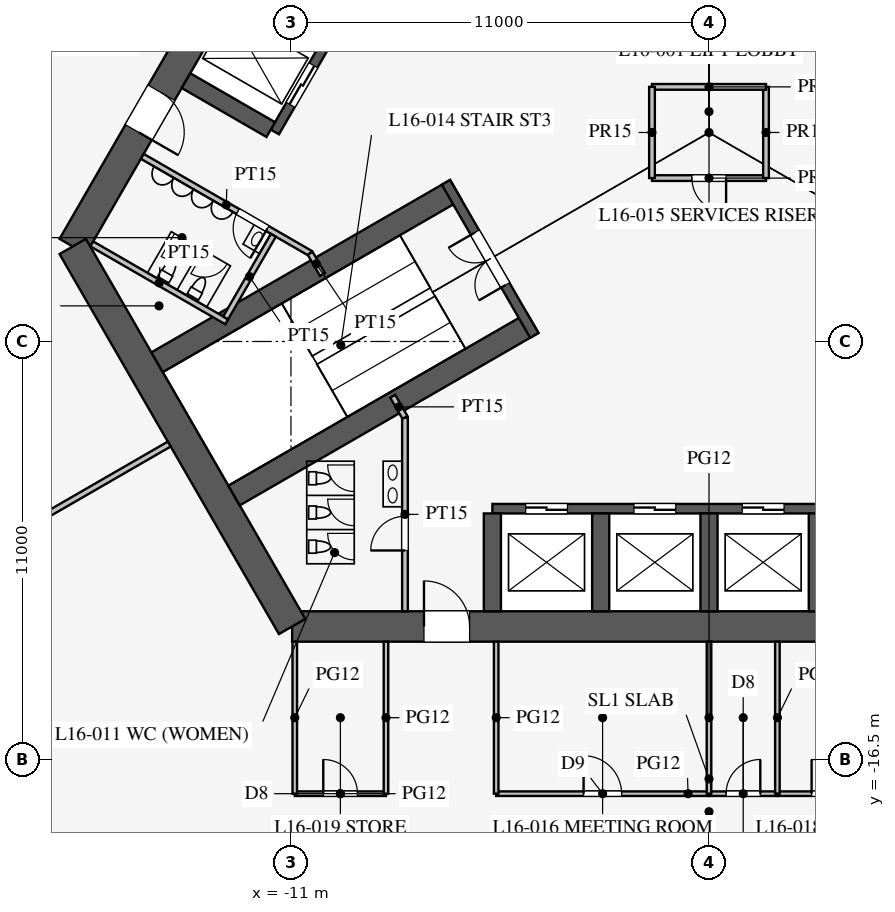
"""IFC4 building model, lengths in metres.
Left out: names, types, materials, properties, quantities, classifications, styles, units other than length and angle.
Written with IfcOpenShell. Run it as: python <this file> out.ifc"""

import sys

from ifc_helpers import new_model, si_unit, direction, frame, frame_2d, origin, place, context, subcontext, project, spatial, rectangle, extrude, element, fill, save


model = new_model("IFC4")
c1 = context("Model", 3, precision=1e-05, world=origin(), true_north=direction((0.0, 1.0)))
c2 = subcontext(c1, "Body", "Model", "MODEL_VIEW")
j1 = project(units=[si_unit("LENGTHUNIT", "METRE"), si_unit("PLANEANGLEUNIT", "RADIAN")], contexts=[c1])
p1 = place(None, origin())
s1 = spatial("IfcSite", under=j1, at=p1, CompositionType="ELEMENT")
p2 = place(p1, origin())
s2 = spatial("IfcBuilding", under=s1, at=p2, CompositionType="ELEMENT")
p3 = place(p2, frame((0.0, 0.0, 71.1)))
s3 = spatial("IfcBuildingStorey", under=s2, at=p3, CompositionType="ELEMENT", Elevation=71.1)
p4 = place(p3, frame((-10.97, -13.0, 0.0), z_axis=(0.0, 0.0, 1.0), x_axis=(1.0, 0.0, 0.0)))
e1 = element("IfcWall", 1, at=p4, inside=s3, PredefinedType="SHEAR", context=c2, shape_type="SweptSolid", body=[
    extrude(rectangle(XDim=21.939, YDim=0.8, at=frame_2d((10.97, 0.0))), origin(), (0.0, 0.0, 1.0), 4.2),
])
p5 = place(p4, frame((17.27, 0.0, 0.0)))
e2 = element("IfcOpeningElement", 2, at=p5, cuts=e1, PredefinedType="OPENING", context=c2, shape_type="SweptSolid", body=[
    extrude(rectangle(XDim=1.2, YDim=2.1, at=frame_2d((0.6, 1.05))), frame((0.0, 0.41, 0.0), z_axis=(0.0, -1.0, 0.0), x_axis=(1.0, 0.0, 0.0)), (0.0, 0.0, 1.0), 0.82),
])
p6 = place(p4, frame((3.47, 0.0, 0.0)))
e3 = element("IfcOpeningElement", 3, at=p6, cuts=e1, PredefinedType="OPENING", context=c2, shape_type="SweptSolid", body=[
    extrude(rectangle(XDim=1.2, YDim=2.1, at=frame_2d((0.6, 1.05))), frame((0.0, 0.41, 0.0), z_axis=(0.0, -1.0, 0.0), x_axis=(1.0, 0.0, 0.0)), (0.0, 0.0, 1.0), 0.82),
])
p7 = place(p3, frame((-5.773, 16.0, 0.0), z_axis=(0.0, 0.0, 1.0), x_axis=(-0.500002442456, -0.866023993627, 0.0)))
e4 = element("IfcWall", 4, at=p7, inside=s3, PredefinedType="SHEAR", context=c2, shape_type="SweptSolid", body=[
    extrude(rectangle(XDim=21.939, YDim=0.8, at=frame_2d((10.97, 0.0))), origin(), (0.0, 0.0, 1.0), 4.2),
])
p8 = place(p7, frame((17.27, 0.0, 0.0)))
e5 = element("IfcOpeningElement", 5, at=p8, cuts=e4, PredefinedType="OPENING", context=c2, shape_type="SweptSolid", body=[
    extrude(rectangle(XDim=1.2, YDim=2.1, at=frame_2d((0.6, 1.05))), frame((0.0, 0.41, 0.0), z_axis=(0.0, -1.0, 0.0), x_axis=(1.0, 0.0, 0.0)), (0.0, 0.0, 1.0), 0.82),
])
p9 = place(p7, frame((3.47, 0.0, 0.0)))
e6 = element("IfcOpeningElement", 6, at=p9, cuts=e4, PredefinedType="OPENING", context=c2, shape_type="SweptSolid", body=[
    extrude(rectangle(XDim=1.2, YDim=2.1, at=frame_2d((0.6, 1.05))), frame((0.0, 0.41, 0.0), z_axis=(0.0, -1.0, 0.0), x_axis=(1.0, 0.0, 0.0)), (0.0, 0.0, 1.0), 0.82),
])
p10 = place(p3, frame((-16.743, -3.0, 0.0), z_axis=(0.0, 0.0, 1.0), x_axis=(0.499995765644, -0.866027848477, 0.0)))
e7 = element("IfcWall", 7, at=p10, inside=s3, PredefinedType="SHEAR", context=c2, shape_type="SweptSolid", body=[
    extrude(rectangle(XDim=11.547, YDim=0.8, at=frame_2d((5.773, 0.0))), origin(), (0.0, 0.0, 1.0), 4.2),
])
p11 = place(p3, frame((-5.7, -9.9, 0.0), z_axis=(0.0, 0.0, 1.0), x_axis=(1.0, 0.0, 0.0)))
e8 = element("IfcWall", 8, at=p11, inside=s3, PredefinedType="SHEAR", context=c2, shape_type="SweptSolid", body=[
    extrude(rectangle(XDim=11.4, YDim=0.25, at=frame_2d((5.7, 0.0))), origin(), (0.0, 0.0, 1.0), 4.2),
])
p12 = place(p11, frame((0.875, 0.0, 0.0)))
e9 = element("IfcOpeningElement", 9, at=p12, cuts=e8, PredefinedType="OPENING", context=c2, shape_type="SweptSolid", body=[
    extrude(rectangle(XDim=1.1, YDim=2.2, at=frame_2d((0.55, 1.1))), frame((0.0, 0.135, 0.0), z_axis=(0.0, -1.0, 0.0), x_axis=(1.0, 0.0, 0.0)), (0.0, 0.0, 1.0), 0.27),
])
p13 = place(p11, frame((3.725, 0.0, 0.0)))
e10 = element("IfcOpeningElement", 10, at=p13, cuts=e8, PredefinedType="OPENING", context=c2, shape_type="SweptSolid", body=[
    extrude(rectangle(XDim=1.1, YDim=2.2, at=frame_2d((0.55, 1.1))), frame((0.0, 0.135, 0.0), z_axis=(0.0, -1.0, 0.0), x_axis=(1.0, 0.0, 0.0)), (0.0, 0.0, 1.0), 0.27),
])
p14 = place(p11, frame((6.575, 0.0, 0.0)))
e11 = element("IfcOpeningElement", 11, at=p14, cuts=e8, PredefinedType="OPENING", context=c2, shape_type="SweptSolid", body=[
    extrude(rectangle(XDim=1.1, YDim=2.2, at=frame_2d((0.55, 1.1))), frame((0.0, 0.135, 0.0), z_axis=(0.0, -1.0, 0.0), x_axis=(1.0, 0.0, 0.0)), (0.0, 0.0, 1.0), 0.27),
])
p15 = place(p11, frame((9.425, 0.0, 0.0)))
e12 = element("IfcOpeningElement", 12, at=p15, cuts=e8, PredefinedType="OPENING", context=c2, shape_type="SweptSolid", body=[
    extrude(rectangle(XDim=1.1, YDim=2.2, at=frame_2d((0.55, 1.1))), frame((0.0, 0.135, 0.0), z_axis=(0.0, -1.0, 0.0), x_axis=(1.0, 0.0, 0.0)), (0.0, 0.0, 1.0), 0.27),
])
for number, where, z_axis, x_axis in (
    (13, (-5.7, -10.025, 0.0), (0.0, 0.0, 1.0), (0.0, -1.0, 0.0)),
    (14, (-2.85, -10.025, 0.0), (0.0, 0.0, 1.0), (0.0, -1.0, 0.0)),
    (15, (0.0, -10.025, 0.0), (0.0, 0.0, 1.0), (0.0, -1.0, 0.0)),
    (16, (2.85, -10.025, 0.0), (0.0, 0.0, 1.0), (0.0, -1.0, 0.0)),
):
    element("IfcWall", number, at=place(p3, frame(where, z_axis=z_axis, x_axis=x_axis)), inside=s3, PredefinedType="SHEAR", context=c2, shape_type="SweptSolid", body=[
        extrude(rectangle(XDim=2.575, YDim=0.45, at=frame_2d((1.288, 0.0))), origin(), (0.0, 0.0, 1.0), 4.2),
    ])
p16 = place(p3, frame((-5.724, 9.886, 0.0), z_axis=(0.0, 0.0, 1.0), x_axis=(-0.500001763848, -0.866024385424, 0.0)))
e17 = element("IfcWall", 17, at=p16, inside=s3, PredefinedType="SHEAR", context=c2, shape_type="SweptSolid", body=[
    extrude(rectangle(XDim=11.4, YDim=0.25, at=frame_2d((5.7, 0.0))), origin(), (0.0, 0.0, 1.0), 4.2),
])
p17 = place(p16, frame((6.525, 0.0, 0.0)))
e18 = element("IfcOpeningElement", 18, at=p17, cuts=e17, PredefinedType="OPENING", context=c2, shape_type="SweptSolid", body=[
    extrude(rectangle(XDim=1.2, YDim=2.2, at=frame_2d((0.6, 1.1))), frame((0.0, 0.135, 0.0), z_axis=(0.0, -1.0, 0.0), x_axis=(1.0, 0.0, 0.0)), (0.0, 0.0, 1.0), 0.27),
])
p18 = place(p16, frame((9.375, 0.0, 0.0)))
e19 = element("IfcOpeningElement", 19, at=p18, cuts=e17, PredefinedType="OPENING", context=c2, shape_type="SweptSolid", body=[
    extrude(rectangle(XDim=1.2, YDim=2.2, at=frame_2d((0.6, 1.1))), frame((0.0, 0.135, 0.0), z_axis=(0.0, -1.0, 0.0), x_axis=(1.0, 0.0, 0.0)), (0.0, 0.0, 1.0), 0.27),
])
p19 = place(p3, frame((-11.532, 0.076, 0.0), z_axis=(0.0, 0.0, 1.0), x_axis=(-0.866005588531, 0.500034319456, 0.0)))
e20 = element("IfcWall", 20, at=p19, inside=s3, PredefinedType="SHEAR", context=c2, shape_type="SweptSolid", body=[
    extrude(rectangle(XDim=2.575, YDim=0.45, at=frame_2d((1.288, 0.0))), origin(), (0.0, 0.0, 1.0), 4.2),
])
for number, where, z_axis, x_axis in (
    (21, (-6.663, -1.509, 0.0), (0.0, 0.0, 1.0), (-0.866, -0.5, 0.0)),
    (22, (-4.638, -5.016, 0.0), (0.0, 0.0, 1.0), (-0.866, -0.5, 0.0)),
):
    element("IfcWall", number, at=place(p3, frame(where, z_axis=z_axis, x_axis=x_axis)), inside=s3, PredefinedType="SHEAR", context=c2, shape_type="SweptSolid", body=[
        extrude(rectangle(XDim=9.075, YDim=0.6, at=frame_2d((4.538, 0.0))), origin(), (0.0, 0.0, 1.0), 4.2),
    ])
p20 = place(p3, frame((-6.922, -1.312, 0.0), z_axis=(0.0, 0.0, 1.0), x_axis=(0.499984536904, -0.866034331223, 0.0)))
e23 = element("IfcWall", 23, at=p20, inside=s3, PredefinedType="SHEAR", context=c2, shape_type="SweptSolid", body=[
    extrude(rectangle(XDim=4.65, YDim=0.25, at=frame_2d((2.325, 0.0))), origin(), (0.0, 0.0, 1.0), 4.2),
])
p21 = place(p20, frame((1.525, 0.0, 0.0)))
e24 = element("IfcOpeningElement", 24, at=p21, cuts=e23, PredefinedType="OPENING", context=c2, shape_type="SweptSolid", body=[
    extrude(rectangle(XDim=1.6, YDim=2.1, at=frame_2d((0.8, 1.05))), frame((0.0, 0.135, 0.0), z_axis=(0.0, -1.0, 0.0), x_axis=(1.0, 0.0, 0.0)), (0.0, 0.0, 1.0), 0.27),
])
p22 = place(p3, frame((-8.0, -7.5, 0.0), z_axis=(0.0, 0.0, 1.0), x_axis=(0.0, -1.0, 0.0)))
e25 = element("IfcWall", 25, at=p22, inside=s3, PredefinedType="PARTITIONING", context=c2, shape_type="SweptSolid", body=[
    extrude(rectangle(XDim=5.1, YDim=0.15, at=frame_2d((2.55, 0.0))), origin(), (0.0, 0.0, 1.0), 4.0),
])
p23 = place(p22, frame((2.6, 0.0, 0.0)))
e26 = element("IfcOpeningElement", 26, at=p23, cuts=e25, PredefinedType="OPENING", context=c2, shape_type="SweptSolid", body=[
    extrude(rectangle(XDim=0.9, YDim=2.1, at=frame_2d((0.45, 1.05))), frame((0.0, 0.085, 0.0), z_axis=(0.0, -1.0, 0.0), x_axis=(1.0, 0.0, 0.0)), (0.0, 0.0, 1.0), 0.17),
])
p24 = place(p3, frame((-10.495, -3.178, 0.0), z_axis=(0.0, 0.0, 1.0), x_axis=(-0.86602216432, 0.500005610874, 0.0)))
e27 = element("IfcWall", 27, at=p24, inside=s3, PredefinedType="PARTITIONING", context=c2, shape_type="SweptSolid", body=[
    extrude(rectangle(XDim=5.1, YDim=0.15, at=frame_2d((2.55, 0.0))), origin(), (0.0, 0.0, 1.0), 4.0),
])
p25 = place(p24, frame((1.3, 0.0, 0.0)))
e28 = element("IfcOpeningElement", 28, at=p25, cuts=e27, PredefinedType="OPENING", context=c2, shape_type="SweptSolid", body=[
    extrude(rectangle(XDim=0.9, YDim=2.1, at=frame_2d((0.45, 1.05))), frame((0.0, 0.085, 0.0), z_axis=(0.0, -1.0, 0.0), x_axis=(1.0, 0.0, 0.0)), (0.0, 0.0, 1.0), 0.17),
])
for number, where, z_axis, x_axis in (
    (29, (-10.495, -3.178, 0.0), (0.0, 0.0, 1.0), (0.5, -0.866, 0.0)),
    (30, (-8.0, -7.5, 0.0), (0.0, 0.0, 1.0), (-0.5, 0.866, 0.0)),
):
    element("IfcWall", number, at=place(p3, frame(where, z_axis=z_axis, x_axis=x_axis)), inside=s3, PredefinedType="PARTITIONING", context=c2, shape_type="SweptSolid", body=[
        extrude(rectangle(XDim=0.645, YDim=0.15, at=frame_2d((0.323, 0.0))), origin(), (0.0, 0.0, 1.0), 4.0),
    ])
p26 = place(p3, frame((-12.691, -4.982, 0.0), z_axis=(0.0, 0.0, 1.0), x_axis=(-0.8660249478, 0.500000789788, 0.0)))
e31 = element("IfcWall", 31, at=p26, inside=s3, PredefinedType="PARTITIONING", context=c2, shape_type="SweptSolid", body=[
    extrude(rectangle(XDim=4.1, YDim=0.15, at=frame_2d((2.05, 0.0))), origin(), (0.0, 0.0, 1.0), 4.0),
])
p27 = place(p3, frame((-11.464, -2.706, 0.0), z_axis=(0.0, 0.0, 1.0), x_axis=(-0.50001992892, -0.866013897511, 0.0)))
e32 = element("IfcWall", 32, at=p27, inside=s3, PredefinedType="PARTITIONING", context=c2, shape_type="SweptSolid", body=[
    extrude(rectangle(XDim=2.51, YDim=0.15, at=frame_2d((1.255, 0.0))), origin(), (0.0, 0.0, 1.0), 4.0),
])
p28 = place(p3, frame((-1.5, -1.2, 0.0), z_axis=(0.0, 0.0, 1.0), x_axis=(1.0, 0.0, 0.0)))
e33 = element("IfcWall", 33, at=p28, inside=s3, PredefinedType="PARTITIONING", context=c2, shape_type="SweptSolid", body=[
    extrude(rectangle(XDim=3.0, YDim=0.15, at=frame_2d((1.5, 0.0))), origin(), (0.0, 0.0, 1.0), 4.0),
])
p29 = place(p28, frame((1.05, 0.0, 0.0)))
e34 = element("IfcOpeningElement", 34, at=p29, cuts=e33, PredefinedType="OPENING", context=c2, shape_type="SweptSolid", body=[
    extrude(rectangle(XDim=0.9, YDim=2.1, at=frame_2d((0.45, 1.05))), frame((0.0, 0.085, 0.0), z_axis=(0.0, -1.0, 0.0), x_axis=(1.0, 0.0, 0.0)), (0.0, 0.0, 1.0), 0.17),
])
p30 = place(p3, frame((1.5, -1.2, 0.0), z_axis=(0.0, 0.0, 1.0), x_axis=(0.0, 1.0, 0.0)))
e35 = element("IfcWall", 35, at=p30, inside=s3, PredefinedType="PARTITIONING", context=c2, shape_type="SweptSolid", body=[
    extrude(rectangle(XDim=2.4, YDim=0.15, at=frame_2d((1.2, 0.0))), origin(), (0.0, 0.0, 1.0), 4.0),
])
p31 = place(p3, frame((1.5, 1.2, 0.0), z_axis=(0.0, 0.0, 1.0), x_axis=(-1.0, 0.0, 0.0)))
e36 = element("IfcWall", 36, at=p31, inside=s3, PredefinedType="PARTITIONING", context=c2, shape_type="SweptSolid", body=[
    extrude(rectangle(XDim=3.0, YDim=0.15, at=frame_2d((1.5, 0.0))), origin(), (0.0, 0.0, 1.0), 4.0),
])
p32 = place(p3, frame((-1.5, 1.2, 0.0), z_axis=(0.0, 0.0, 1.0), x_axis=(0.0, -1.0, 0.0)))
e37 = element("IfcWall", 37, at=p32, inside=s3, PredefinedType="PARTITIONING", context=c2, shape_type="SweptSolid", body=[
    extrude(rectangle(XDim=2.4, YDim=0.15, at=frame_2d((1.2, 0.0))), origin(), (0.0, 0.0, 1.0), 4.0),
])
p33 = place(p3, frame((-14.203, -8.2, 0.0), z_axis=(0.0, 0.0, 1.0), x_axis=(-0.866024965723, -0.500000758745, 0.0)))
e38 = element("IfcWall", 38, at=p33, inside=s3, PredefinedType="PARTITIONING", context=c2, shape_type="SweptSolid", body=[
    extrude(rectangle(XDim=18.25, YDim=0.15, at=frame_2d((9.125, 0.0))), origin(), (0.0, 0.0, 1.0), 2.3),
])
p34 = place(p3, frame((1.8, -17.4, 0.0), z_axis=(0.0, 0.0, 1.0), x_axis=(1.0, 0.0, 0.0)))
e39 = element("IfcWall", 39, at=p34, inside=s3, PredefinedType="PARTITIONING", context=c2, shape_type="SweptSolid", body=[
    extrude(rectangle(XDim=2.7, YDim=0.12, at=frame_2d((1.35, 0.0))), origin(), (0.0, 0.0, 1.0), 2.9),
])
p35 = place(p34, frame((0.9, 0.0, 0.15)))
e40 = element("IfcOpeningElement", 40, at=p35, cuts=e39, PredefinedType="OPENING", context=c2, shape_type="SweptSolid", body=[
    extrude(rectangle(XDim=0.9, YDim=2.1, at=frame_2d((0.45, 1.05))), frame((0.0, 0.07, 0.0), z_axis=(0.0, -1.0, 0.0), x_axis=(1.0, 0.0, 0.0)), (0.0, 0.0, 1.0), 0.14),
])
p36 = place(p3, frame((0.0, -17.4, 0.0), z_axis=(0.0, 0.0, 1.0), x_axis=(1.0, 0.0, 0.0)))
e41 = element("IfcWall", 41, at=p36, inside=s3, PredefinedType="PARTITIONING", context=c2, shape_type="SweptSolid", body=[
    extrude(rectangle(XDim=1.8, YDim=0.12, at=frame_2d((0.9, 0.0))), origin(), (0.0, 0.0, 1.0), 2.9),
])
p37 = place(p36, frame((0.45, 0.0, 0.15)))
e42 = element("IfcOpeningElement", 42, at=p37, cuts=e41, PredefinedType="OPENING", context=c2, shape_type="SweptSolid", body=[
    extrude(rectangle(XDim=0.9, YDim=2.1, at=frame_2d((0.45, 1.05))), frame((0.0, 0.07, 0.0), z_axis=(0.0, -1.0, 0.0), x_axis=(1.0, 0.0, 0.0)), (0.0, 0.0, 1.0), 0.14),
])
p38 = place(p3, frame((-10.9, -17.4, 0.0), z_axis=(0.0, 0.0, 1.0), x_axis=(1.0, 0.0, 0.0)))
e43 = element("IfcWall", 43, at=p38, inside=s3, PredefinedType="PARTITIONING", context=c2, shape_type="SweptSolid", body=[
    extrude(rectangle(XDim=2.4, YDim=0.12, at=frame_2d((1.2, 0.0))), origin(), (0.0, 0.0, 1.0), 2.9),
])
p39 = place(p38, frame((0.75, 0.0, 0.15)))
e44 = element("IfcOpeningElement", 44, at=p39, cuts=e43, PredefinedType="OPENING", context=c2, shape_type="SweptSolid", body=[
    extrude(rectangle(XDim=0.9, YDim=2.1, at=frame_2d((0.45, 1.05))), frame((0.0, 0.07, 0.0), z_axis=(0.0, -1.0, 0.0), x_axis=(1.0, 0.0, 0.0)), (0.0, 0.0, 1.0), 0.14),
])
p40 = place(p3, frame((-5.6, -17.4, 0.0), z_axis=(0.0, 0.0, 1.0), x_axis=(1.0, 0.0, 0.0)))
e45 = element("IfcWall", 45, at=p40, inside=s3, PredefinedType="PARTITIONING", context=c2, shape_type="SweptSolid", body=[
    extrude(rectangle(XDim=5.6, YDim=0.12, at=frame_2d((2.8, 0.0))), origin(), (0.0, 0.0, 1.0), 2.9),
])
p41 = place(p40, frame((2.3, 0.0, 0.15)))
e46 = element("IfcOpeningElement", 46, at=p41, cuts=e45, PredefinedType="OPENING", context=c2, shape_type="SweptSolid", body=[
    extrude(rectangle(XDim=1.0, YDim=2.1, at=frame_2d((0.5, 1.05))), frame((0.0, 0.07, 0.0), z_axis=(0.0, -1.0, 0.0), x_axis=(1.0, 0.0, 0.0)), (0.0, 0.0, 1.0), 0.14),
])
p42 = place(p3, frame((1.8, -13.4, 0.0), z_axis=(0.0, 0.0, 1.0), x_axis=(0.0, -1.0, 0.0)))
e47 = element("IfcWall", 47, at=p42, inside=s3, PredefinedType="PARTITIONING", context=c2, shape_type="SweptSolid", body=[
    extrude(rectangle(XDim=4.0, YDim=0.12, at=frame_2d((2.0, 0.0))), origin(), (0.0, 0.0, 1.0), 2.9),
])
p43 = place(p3, frame((0.0, -13.4, 0.0), z_axis=(0.0, 0.0, 1.0), x_axis=(0.0, -1.0, 0.0)))
e48 = element("IfcWall", 48, at=p43, inside=s3, PredefinedType="PARTITIONING", context=c2, shape_type="SweptSolid", body=[
    extrude(rectangle(XDim=4.0, YDim=0.12, at=frame_2d((2.0, 0.0))), origin(), (0.0, 0.0, 1.0), 2.8),
])
for number, where, z_axis, x_axis in (
    (49, (-10.9, -13.4, 0.0), (0.0, 0.0, 1.0), (0.0, -1.0, 0.0)),
    (50, (-5.6, -13.4, 0.0), (0.0, 0.0, 1.0), (0.0, -1.0, 0.0)),
    (51, (-8.5, -13.4, 0.0), (0.0, 0.0, 1.0), (0.0, -1.0, 0.0)),
):
    element("IfcWall", number, at=place(p3, frame(where, z_axis=z_axis, x_axis=x_axis)), inside=s3, PredefinedType="PARTITIONING", context=c2, shape_type="SweptSolid", body=[
        extrude(rectangle(XDim=4.0, YDim=0.12, at=frame_2d((2.0, 0.0))), origin(), (0.0, 0.0, 1.0), 2.9),
    ])
p44 = place(p23, frame((0.9, 0.0, 0.0), z_axis=(0.0, 0.0, 1.0), x_axis=(-1.0, 0.0, 0.0)))
e52 = element("IfcDoor", 52, at=p44, inside=s3, OperationType="SINGLE_SWING_LEFT", PredefinedType="DOOR", context=c2, shape_type="SweptSolid", body=[
    extrude(rectangle(XDim=0.9, YDim=2.1, at=frame_2d((0.45, 1.05))), frame((0.0, 0.025, 0.0), z_axis=(0.0, -1.0, 0.0), x_axis=(1.0, 0.0, 0.0)), (0.0, 0.0, 1.0), 0.05),
])
fill(e26, e52)
p45 = place(p25, origin())
e53 = element("IfcDoor", 53, at=p45, inside=s3, OperationType="SINGLE_SWING_LEFT", PredefinedType="DOOR", context=c2, shape_type="SweptSolid", body=[
    extrude(rectangle(XDim=0.9, YDim=2.1, at=frame_2d((0.45, 1.05))), frame((0.0, 0.025, 0.0), z_axis=(0.0, -1.0, 0.0), x_axis=(1.0, 0.0, 0.0)), (0.0, 0.0, 1.0), 0.05),
])
fill(e28, e53)
p46 = place(p29, frame((0.9, 0.0, 0.0), z_axis=(0.0, 0.0, 1.0), x_axis=(-1.0, 0.0, 0.0)))
e54 = element("IfcDoor", 54, at=p46, inside=s3, OperationType="SINGLE_SWING_LEFT", PredefinedType="DOOR", context=c2, shape_type="SweptSolid", body=[
    extrude(rectangle(XDim=0.9, YDim=2.1, at=frame_2d((0.45, 1.05))), frame((0.0, 0.025, 0.0), z_axis=(0.0, -1.0, 0.0), x_axis=(1.0, 0.0, 0.0)), (0.0, 0.0, 1.0), 0.05),
])
fill(e34, e54)
p47 = place(p21, frame((1.6, 0.0, 0.0), z_axis=(0.0, 0.0, 1.0), x_axis=(-1.0, 0.0, 0.0)))
e55 = element("IfcDoor", 55, at=p47, inside=s3, OperationType="DOUBLE_DOOR_SINGLE_SWING", PredefinedType="DOOR", context=c2, shape_type="SweptSolid", body=[
    extrude(rectangle(XDim=1.6, YDim=2.1, at=frame_2d((0.8, 1.05))), frame((0.0, 0.025, 0.0), z_axis=(0.0, -1.0, 0.0), x_axis=(1.0, 0.0, 0.0)), (0.0, 0.0, 1.0), 0.05),
])
fill(e24, e55)
p48 = place(p6, origin())
e56 = element("IfcDoor", 56, at=p48, inside=s3, OperationType="SINGLE_SWING_LEFT", PredefinedType="DOOR", context=c2, shape_type="SweptSolid", body=[
    extrude(rectangle(XDim=1.2, YDim=2.1, at=frame_2d((0.6, 1.05))), frame((0.0, 0.025, 0.0), z_axis=(0.0, -1.0, 0.0), x_axis=(1.0, 0.0, 0.0)), (0.0, 0.0, 1.0), 0.05),
])
fill(e3, e56)
p49 = place(p8, origin())
e57 = element("IfcDoor", 57, at=p49, inside=s3, OperationType="SINGLE_SWING_RIGHT", PredefinedType="DOOR", context=c2, shape_type="SweptSolid", body=[
    extrude(rectangle(XDim=1.2, YDim=2.1, at=frame_2d((0.6, 1.05))), frame((0.0, 0.025, 0.0), z_axis=(0.0, -1.0, 0.0), x_axis=(1.0, 0.0, 0.0)), (0.0, 0.0, 1.0), 0.05),
])
fill(e5, e57)
p50 = place(p41, origin())
e58 = element("IfcDoor", 58, at=p50, inside=s3, OperationType="SINGLE_SWING_LEFT", PredefinedType="DOOR", context=c2, shape_type="SweptSolid", body=[
    extrude(rectangle(XDim=1.0, YDim=2.1, at=frame_2d((0.5, 1.05))), frame((0.0, 0.025, 0.0), z_axis=(0.0, -1.0, 0.0), x_axis=(1.0, 0.0, 0.0)), (0.0, 0.0, 1.0), 0.05),
])
fill(e46, e58)
p51 = place(p37, origin())
e59 = element("IfcDoor", 59, at=p51, inside=s3, OperationType="SINGLE_SWING_RIGHT", PredefinedType="DOOR", context=c2, shape_type="SweptSolid", body=[
    extrude(rectangle(XDim=0.9, YDim=2.1, at=frame_2d((0.45, 1.05))), frame((0.0, 0.025, 0.0), z_axis=(0.0, -1.0, 0.0), x_axis=(1.0, 0.0, 0.0)), (0.0, 0.0, 1.0), 0.05),
])
fill(e42, e59)
p52 = place(p35, origin())
e60 = element("IfcDoor", 60, at=p52, inside=s3, OperationType="SINGLE_SWING_LEFT", PredefinedType="DOOR", context=c2, shape_type="SweptSolid", body=[
    extrude(rectangle(XDim=0.9, YDim=2.1, at=frame_2d((0.45, 1.05))), frame((0.0, 0.025, 0.0), z_axis=(0.0, -1.0, 0.0), x_axis=(1.0, 0.0, 0.0)), (0.0, 0.0, 1.0), 0.05),
])
fill(e40, e60)
p53 = place(p39, origin())
e61 = element("IfcDoor", 61, at=p53, inside=s3, OperationType="SINGLE_SWING_LEFT", PredefinedType="DOOR", context=c2, shape_type="SweptSolid", body=[
    extrude(rectangle(XDim=0.9, YDim=2.1, at=frame_2d((0.45, 1.05))), frame((0.0, 0.025, 0.0), z_axis=(0.0, -1.0, 0.0), x_axis=(1.0, 0.0, 0.0)), (0.0, 0.0, 1.0), 0.05),
])
fill(e44, e61)
p54 = place(p12, origin())
e62 = element("IfcDoor", 62, at=p54, inside=s3, OperationType="DOUBLE_DOOR_SLIDING", PredefinedType="DOOR", context=c2, shape_type="SweptSolid", body=[
    extrude(rectangle(XDim=1.1, YDim=2.2, at=frame_2d((0.55, 1.1))), frame((0.0, 0.025, 0.0), z_axis=(0.0, -1.0, 0.0), x_axis=(1.0, 0.0, 0.0)), (0.0, 0.0, 1.0), 0.05),
])
fill(e9, e62)
p55 = place(p13, origin())
e63 = element("IfcDoor", 63, at=p55, inside=s3, OperationType="DOUBLE_DOOR_SLIDING", PredefinedType="DOOR", context=c2, shape_type="SweptSolid", body=[
    extrude(rectangle(XDim=1.1, YDim=2.2, at=frame_2d((0.55, 1.1))), frame((0.0, 0.025, 0.0), z_axis=(0.0, -1.0, 0.0), x_axis=(1.0, 0.0, 0.0)), (0.0, 0.0, 1.0), 0.05),
])
fill(e10, e63)
p56 = place(p14, origin())
e64 = element("IfcDoor", 64, at=p56, inside=s3, OperationType="DOUBLE_DOOR_SLIDING", PredefinedType="DOOR", context=c2, shape_type="SweptSolid", body=[
    extrude(rectangle(XDim=1.1, YDim=2.2, at=frame_2d((0.55, 1.1))), frame((0.0, 0.025, 0.0), z_axis=(0.0, -1.0, 0.0), x_axis=(1.0, 0.0, 0.0)), (0.0, 0.0, 1.0), 0.05),
])
fill(e11, e64)
p57 = place(p18, origin())
e65 = element("IfcDoor", 65, at=p57, inside=s3, OperationType="DOUBLE_DOOR_SLIDING", PredefinedType="DOOR", context=c2, shape_type="SweptSolid", body=[
    extrude(rectangle(XDim=1.2, YDim=2.2, at=frame_2d((0.6, 1.1))), frame((0.0, 0.025, 0.0), z_axis=(0.0, -1.0, 0.0), x_axis=(1.0, 0.0, 0.0)), (0.0, 0.0, 1.0), 0.05),
])
fill(e19, e65)
save(model, sys.argv[1])
